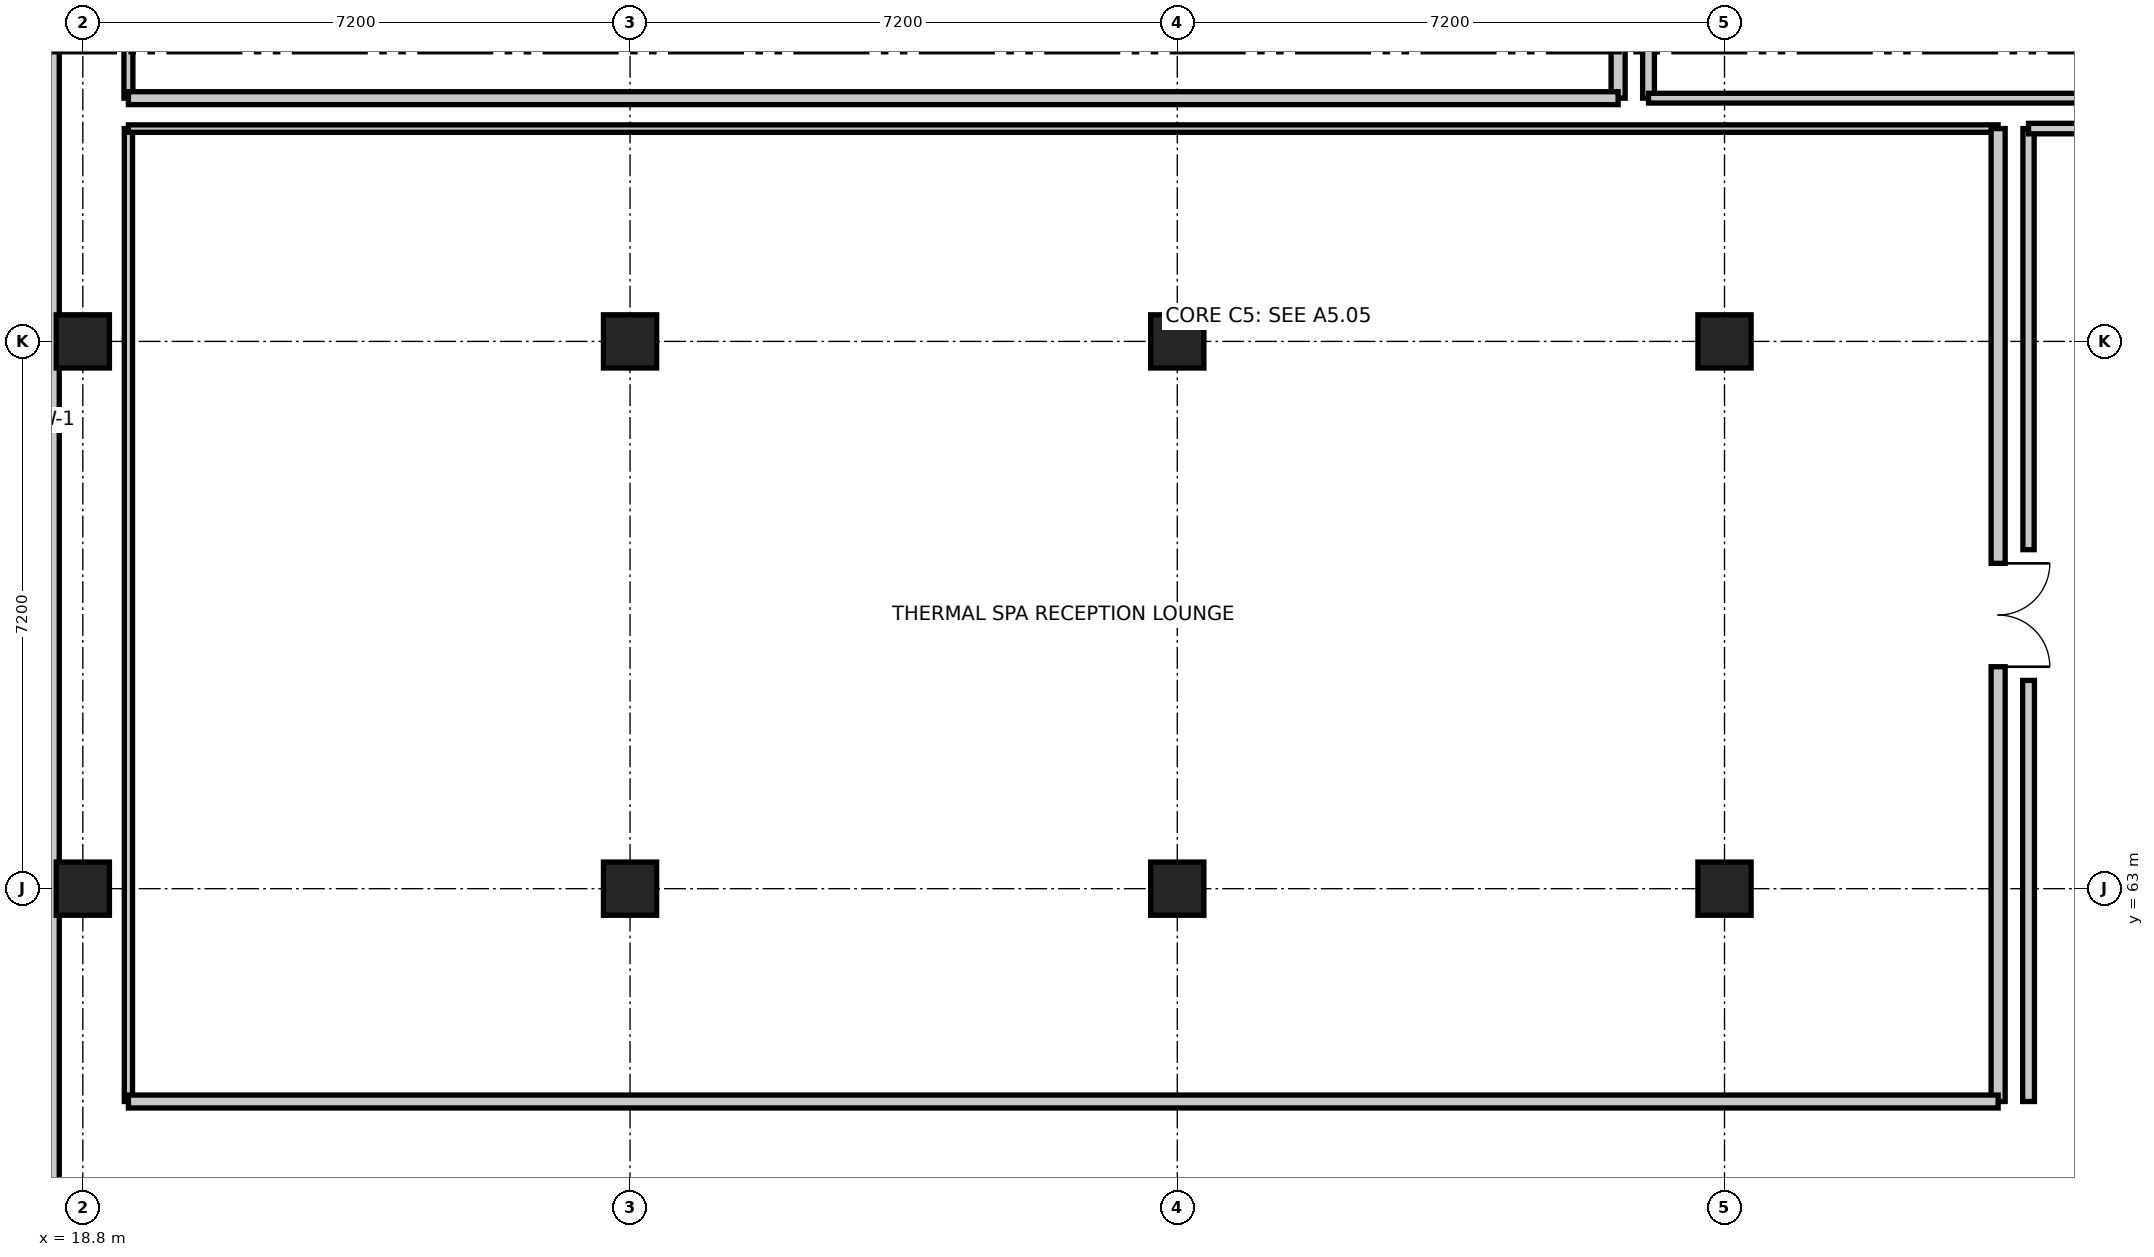
"""IFC4 building model, lengths in metres.
Left out: names, types, materials, properties, quantities, classifications, styles, units other than length and angle.
Written with IfcOpenShell. Run it as: python <this file> out.ifc"""

import sys

from ifc_helpers import new_model, si_unit, direction, frame, frame_2d, origin, origin_2d, place, context, subcontext, project, spatial, rectangle, extrude, element, fill, save


model = new_model("IFC4")
c1 = context("Model", 3, precision=1e-05, world=origin(), true_north=direction((0.0, 1.0)))
c2 = subcontext(c1, "Body", "Model", "MODEL_VIEW")
j1 = project(units=[si_unit("LENGTHUNIT", "METRE"), si_unit("PLANEANGLEUNIT", "RADIAN")], contexts=[c1])
p1 = place(None, origin())
s1 = spatial("IfcSite", under=j1, at=p1, CompositionType="ELEMENT")
p2 = place(p1, origin())
s2 = spatial("IfcBuilding", under=s1, at=p2, CompositionType="ELEMENT")
p3 = place(p2, origin())
s3 = spatial("IfcBuildingStorey", under=s2, at=p3, CompositionType="ELEMENT", Elevation=0.0)
for number, where, z_axis, x_axis in (
    (1, (18.8, 63.0, 0.0), (0.0, 0.0, 1.0), (1.0, 0.0, 0.0)),
    (2, (18.8, 70.2, 0.0), (0.0, 0.0, 1.0), (1.0, 0.0, 0.0)),
    (3, (26.0, 63.0, 0.0), (0.0, 0.0, 1.0), (1.0, 0.0, 0.0)),
    (4, (26.0, 70.2, 0.0), (0.0, 0.0, 1.0), (1.0, 0.0, 0.0)),
    (5, (33.2, 63.0, 0.0), (0.0, 0.0, 1.0), (1.0, 0.0, 0.0)),
    (6, (33.2, 70.2, 0.0), (0.0, 0.0, 1.0), (1.0, 0.0, 0.0)),
    (7, (40.4, 63.0, 0.0), (0.0, 0.0, 1.0), (1.0, 0.0, 0.0)),
    (8, (40.4, 70.2, 0.0), (0.0, 0.0, 1.0), (1.0, 0.0, 0.0)),
):
    element("IfcColumn", number, at=place(p3, frame(where, z_axis=z_axis, x_axis=x_axis)), inside=s3, PredefinedType="COLUMN", context=c2, shape_type="SweptSolid", body=[
        extrude(rectangle(XDim=0.7, YDim=0.7, at=origin_2d()), origin(), (0.0, 0.0, 1.0), 5.4),
    ])
p4 = place(p3, frame((18.37, 46.68, 0.0), z_axis=(0.0, 0.0, 1.0), x_axis=(0.0, 1.0, 0.0)))
e9 = element("IfcWall", 9, at=p4, inside=s3, PredefinedType="PARAPET", context=c2, shape_type="SweptSolid", body=[
    extrude(rectangle(XDim=44.97, YDim=0.24, at=frame_2d((22.485, 0.0))), origin(), (0.0, 0.0, 1.0), 3.848),
])
p5 = place(p3, frame((19.4, 60.2, 0.0), z_axis=(0.0, 0.0, 1.0), x_axis=(0.0, 1.0, 0.0)))
e10 = element("IfcWall", 10, at=p5, inside=s3, PredefinedType="PARTITIONING", context=c2, shape_type="SweptSolid", body=[
    extrude(rectangle(XDim=12.8, YDim=0.108, at=frame_2d((6.4, 0.0))), origin(), (0.0, 0.0, 1.0), 4.435),
])
p6 = place(p3, frame((19.4, 73.0, 0.0), z_axis=(0.0, 0.0, 1.0), x_axis=(1.0, 0.0, 0.0)))
e11 = element("IfcWall", 11, at=p6, inside=s3, PredefinedType="PARTITIONING", context=c2, shape_type="SweptSolid", body=[
    extrude(rectangle(XDim=24.6, YDim=0.098, at=frame_2d((12.3, 0.0))), origin(), (0.0, 0.0, 1.0), 4.548),
])
p7 = place(p3, frame((44.0, 73.0, 0.0), z_axis=(0.0, 0.0, 1.0), x_axis=(0.0, -1.0, 0.0)))
e12 = element("IfcWall", 12, at=p7, inside=s3, PredefinedType="PARTITIONING", context=c2, shape_type="SweptSolid", body=[
    extrude(rectangle(XDim=12.8, YDim=0.185, at=frame_2d((6.4, 0.0))), origin(), (0.0, 0.0, 1.0), 4.435),
])
p8 = place(p7, frame((5.72, 0.0, 0.0)))
e13 = element("IfcOpeningElement", 13, at=p8, cuts=e12, PredefinedType="OPENING", context=c2, shape_type="SweptSolid", body=[
    extrude(rectangle(XDim=1.36, YDim=2.22, at=frame_2d((0.68, 1.11))), frame((0.0, 0.103, 0.0), z_axis=(0.0, -1.0, 0.0), x_axis=(1.0, 0.0, 0.0)), (0.0, 0.0, 1.0), 0.205),
])
p9 = place(p3, frame((44.0, 60.2, 0.0), z_axis=(0.0, 0.0, 1.0), x_axis=(-1.0, 0.0, 0.0)))
e14 = element("IfcWall", 14, at=p9, inside=s3, PredefinedType="PARTITIONING", context=c2, shape_type="SweptSolid", body=[
    extrude(rectangle(XDim=24.6, YDim=0.17, at=frame_2d((12.3, 0.0))), origin(), (0.0, 0.0, 1.0), 4.548),
])
p10 = place(p3, frame((44.4, 60.2, 0.0), z_axis=(0.0, 0.0, 1.0), x_axis=(0.0, 1.0, 0.0)))
e15 = element("IfcWall", 15, at=p10, inside=s3, PredefinedType="PARTITIONING", context=c2, shape_type="SweptSolid", body=[
    extrude(rectangle(XDim=5.54, YDim=0.155, at=frame_2d((2.77, 0.0))), origin(), (0.0, 0.0, 1.0), 4.435),
])
p11 = place(p3, frame((44.4, 67.46, 0.0), z_axis=(0.0, 0.0, 1.0), x_axis=(0.0, 1.0, 0.0)))
e16 = element("IfcWall", 16, at=p11, inside=s3, PredefinedType="PARTITIONING", context=c2, shape_type="SweptSolid", body=[
    extrude(rectangle(XDim=5.54, YDim=0.148, at=frame_2d((2.77, 0.0))), origin(), (0.0, 0.0, 1.0), 4.435),
])
p12 = place(p3, frame((44.4, 73.0, 0.0), z_axis=(0.0, 0.0, 1.0), x_axis=(1.0, 0.0, 0.0)))
e17 = element("IfcWall", 17, at=p12, inside=s3, PredefinedType="PARTITIONING", context=c2, shape_type="SweptSolid", body=[
    extrude(rectangle(XDim=17.4, YDim=0.138, at=frame_2d((8.7, 0.0))), origin(), (0.0, 0.0, 1.0), 4.548),
])
p13 = place(p3, frame((19.4, 73.4, 0.0), z_axis=(0.0, 0.0, 1.0), x_axis=(0.0, 1.0, 0.0)))
e18 = element("IfcWall", 18, at=p13, inside=s3, PredefinedType="PARTITIONING", context=c2, shape_type="SweptSolid", body=[
    extrude(rectangle(XDim=13.2, YDim=0.118, at=frame_2d((6.6, 0.0))), origin(), (0.0, 0.0, 1.0), 4.435),
])
p14 = place(p3, frame((39.0, 86.6, 0.0), z_axis=(0.0, 0.0, 1.0), x_axis=(0.0, -1.0, 0.0)))
e19 = element("IfcWall", 19, at=p14, inside=s3, PredefinedType="PARTITIONING", context=c2, shape_type="SweptSolid", body=[
    extrude(rectangle(XDim=13.2, YDim=0.185, at=frame_2d((6.6, 0.0))), origin(), (0.0, 0.0, 1.0), 4.435),
])
p15 = place(p3, frame((39.0, 73.4, 0.0), z_axis=(0.0, 0.0, 1.0), x_axis=(-1.0, 0.0, 0.0)))
e20 = element("IfcWall", 20, at=p15, inside=s3, PredefinedType="PARTITIONING", context=c2, shape_type="SweptSolid", body=[
    extrude(rectangle(XDim=19.6, YDim=0.17, at=frame_2d((9.8, 0.0))), origin(), (0.0, 0.0, 1.0), 4.548),
])
p16 = place(p3, frame((39.4, 73.4, 0.0), z_axis=(0.0, 0.0, 1.0), x_axis=(0.0, 1.0, 0.0)))
e21 = element("IfcWall", 21, at=p16, inside=s3, PredefinedType="PARTITIONING", context=c2, shape_type="SweptSolid", body=[
    extrude(rectangle(XDim=13.2, YDim=0.155, at=frame_2d((6.6, 0.0))), origin(), (0.0, 0.0, 1.0), 4.435),
])
p17 = place(p3, frame((61.8, 73.4, 0.0), z_axis=(0.0, 0.0, 1.0), x_axis=(-1.0, 0.0, 0.0)))
e22 = element("IfcWall", 22, at=p17, inside=s3, PredefinedType="PARTITIONING", context=c2, shape_type="SweptSolid", body=[
    extrude(rectangle(XDim=22.4, YDim=0.128, at=frame_2d((11.2, 0.0))), origin(), (0.0, 0.0, 1.0), 4.548),
])
p18 = place(p8, origin())
e23 = element("IfcDoor", 23, at=p18, inside=s3, OperationType="DOUBLE_DOOR_SINGLE_SWING", PredefinedType="DOOR", context=c2, shape_type="SweptSolid", body=[
    extrude(rectangle(XDim=1.36, YDim=2.22, at=frame_2d((0.68, 1.11))), frame((0.0, 0.025, 0.0), z_axis=(0.0, -1.0, 0.0), x_axis=(1.0, 0.0, 0.0)), (0.0, 0.0, 1.0), 0.05),
])
fill(e13, e23)
save(model, sys.argv[1])
